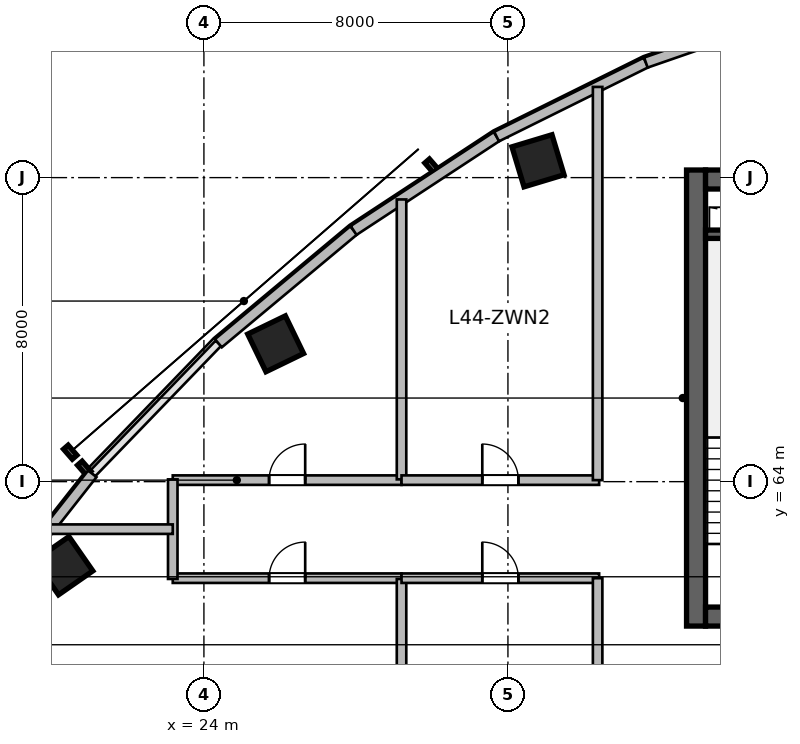
"""IFC4 building model, lengths in metres.
Left out: names, types, materials, properties, quantities, classifications, styles, units other than length and angle.
Written with IfcOpenShell. Run it as: python <this file> out.ifc"""

import sys

from ifc_helpers import new_model, si_unit, direction, frame, frame_2d, origin, origin_2d, place, context, subcontext, project, spatial, rectangle, extrude, source, transform, mapped, element, fill, save


model = new_model("IFC4")
c1 = context("Model", 3, precision=1e-05, world=origin(), true_north=direction((0.0, 1.0)))
c2 = subcontext(c1, "Body", "Model", "MODEL_VIEW")
j1 = project(units=[si_unit("LENGTHUNIT", "METRE"), si_unit("PLANEANGLEUNIT", "RADIAN")], contexts=[c1])
p1 = place(None, origin())
s1 = spatial("IfcSite", under=j1, at=p1, CompositionType="ELEMENT")
p2 = place(p1, origin())
s2 = spatial("IfcBuilding", under=s1, at=p2, CompositionType="ELEMENT")
p3 = place(p2, frame((0.0, 0.0, 181.8)))
s3 = spatial("IfcBuildingStorey", under=s2, at=p3, CompositionType="ELEMENT", Elevation=181.8)
m1 = source(origin(), c2, "Body", "SweptSolid", [
    extrude(rectangle(XDim=12.0, YDim=0.5, at=frame_2d((6.0, 0.0))), origin(), (0.0, 0.0, 1.0), 3.9),
])
p4 = place(p3, frame((36.95, 60.2, 0.0), z_axis=(0.0, 0.0, 1.0), x_axis=(0.0, 1.0, 0.0)))
e1 = element("IfcWall", 1, at=p4, inside=s3, PredefinedType="SHEAR", context=c2, shape_type="MappedRepresentation", body=[
    mapped(m1, transform((0.0, 0.0, 0.0), scale=1.0)),
])
m2 = source(origin(), c2, "Body", "SweptSolid", [
    extrude(rectangle(XDim=21.6, YDim=0.5, at=frame_2d((10.8, 0.0))), origin(), (0.0, 0.0, 1.0), 3.9),
])
p5 = place(p3, frame((37.2, 60.45, 0.0), z_axis=(0.0, 0.0, 1.0), x_axis=(1.0, 0.0, 0.0)))
e2 = element("IfcWall", 2, at=p5, inside=s3, PredefinedType="SHEAR", context=c2, shape_type="MappedRepresentation", body=[
    mapped(m2, transform((0.0, 0.0, 0.0), scale=1.0)),
])
p6 = place(p5, frame((1.1, 0.0, 0.0)))
e3 = element("IfcOpeningElement", 3, at=p6, cuts=e2, PredefinedType="OPENING", context=c2, shape_type="SweptSolid", body=[
    extrude(rectangle(XDim=1.15, YDim=2.15, at=frame_2d((0.575, 1.075))), frame((0.0, 0.26, 0.0), z_axis=(0.0, -1.0, 0.0), x_axis=(1.0, 0.0, 0.0)), (0.0, 0.0, 1.0), 0.52),
])
p7 = place(p5, frame((19.5, 0.0, 0.0)))
e4 = element("IfcOpeningElement", 4, at=p7, cuts=e2, PredefinedType="OPENING", context=c2, shape_type="SweptSolid", body=[
    extrude(rectangle(XDim=0.9, YDim=2.1, at=frame_2d((0.45, 1.05))), frame((0.0, 0.26, 0.0), z_axis=(0.0, -1.0, 0.0), x_axis=(1.0, 0.0, 0.0)), (0.0, 0.0, 1.0), 0.52),
])
p8 = place(p5, frame((12.02, 0.0, 0.0)))
e5 = element("IfcOpeningElement", 5, at=p8, cuts=e2, PredefinedType="OPENING", context=c2, shape_type="SweptSolid", body=[
    extrude(rectangle(XDim=1.6, YDim=2.15, at=frame_2d((0.8, 1.075))), frame((0.0, 0.26, 0.0), z_axis=(0.0, -1.0, 0.0), x_axis=(1.0, 0.0, 0.0)), (0.0, 0.0, 1.0), 0.52),
])
p9 = place(p3, frame((37.2, 71.95, 0.0), z_axis=(0.0, 0.0, 1.0), x_axis=(1.0, 0.0, 0.0)))
e6 = element("IfcWall", 6, at=p9, inside=s3, PredefinedType="SHEAR", context=c2, shape_type="MappedRepresentation", body=[
    mapped(m2, transform((0.0, 0.0, 0.0), scale=1.0)),
])
p10 = place(p9, frame((1.2, 0.0, 0.0)))
e7 = element("IfcOpeningElement", 7, at=p10, cuts=e6, PredefinedType="OPENING", context=c2, shape_type="SweptSolid", body=[
    extrude(rectangle(XDim=0.9, YDim=2.1, at=frame_2d((0.45, 1.05))), frame((0.0, 0.26, 0.0), z_axis=(0.0, -1.0, 0.0), x_axis=(1.0, 0.0, 0.0)), (0.0, 0.0, 1.0), 0.52),
])
p11 = place(p9, frame((14.7, 0.0, 0.0)))
e8 = element("IfcOpeningElement", 8, at=p11, cuts=e6, PredefinedType="OPENING", context=c2, shape_type="SweptSolid", body=[
    extrude(rectangle(XDim=1.2, YDim=2.15, at=frame_2d((0.6, 1.075))), frame((0.0, 0.26, 0.0), z_axis=(0.0, -1.0, 0.0), x_axis=(1.0, 0.0, 0.0)), (0.0, 0.0, 1.0), 0.52),
])
p12 = place(p9, frame((4.15, 0.0, 0.0)))
e9 = element("IfcOpeningElement", 9, at=p12, cuts=e6, PredefinedType="OPENING", context=c2, shape_type="SweptSolid", body=[
    extrude(rectangle(XDim=1.3, YDim=2.15, at=frame_2d((0.65, 1.075))), frame((0.0, 0.26, 0.0), z_axis=(0.0, -1.0, 0.0), x_axis=(1.0, 0.0, 0.0)), (0.0, 0.0, 1.0), 0.52),
])
p13 = place(p9, frame((7.25, 0.0, 0.0)))
e10 = element("IfcOpeningElement", 10, at=p13, cuts=e6, PredefinedType="OPENING", context=c2, shape_type="SweptSolid", body=[
    extrude(rectangle(XDim=0.9, YDim=2.1, at=frame_2d((0.45, 1.05))), frame((0.0, 0.26, 0.0), z_axis=(0.0, -1.0, 0.0), x_axis=(1.0, 0.0, 0.0)), (0.0, 0.0, 1.0), 0.52),
])
m3 = source(origin(), c2, "Body", "SweptSolid", [
    extrude(rectangle(XDim=3.27, YDim=0.22, at=frame_2d((1.635, 0.0))), origin(), (0.0, 0.0, 1.0), 3.9),
])
p14 = place(p3, frame((37.2, 70.51, 0.0), z_axis=(0.0, 0.0, 1.0), x_axis=(1.0, 0.0, 0.0)))
e11 = element("IfcWall", 11, at=p14, inside=s3, PredefinedType="SHEAR", context=c2, shape_type="MappedRepresentation", body=[
    mapped(m3, transform((0.0, 0.0, 0.0), scale=1.0)),
])
m4 = source(origin(), c2, "Body", "SweptSolid", [
    extrude(rectangle(XDim=1.1, YDim=1.1, at=origin_2d()), origin(), (0.0, 0.0, 1.0), 3.9),
])
for number, where, z_axis, x_axis in (
    (12, (20.311, 61.789, 0.0), (0.0, 0.0, 1.0), (-0.571, 0.821, 0.0)),
    (13, (25.888, 67.627, 0.0), (0.0, 0.0, 1.0), (-0.436, 0.9, 0.0)),
    (14, (32.791, 72.442, 0.0), (0.0, 0.0, 1.0), (-0.289, 0.957, 0.0)),
):
    element("IfcColumn", number, at=place(p3, frame(where, z_axis=z_axis, x_axis=x_axis)), inside=s3, PredefinedType="COLUMN", context=c2, shape_type="MappedRepresentation", body=[
        mapped(m4, transform((0.0, 0.0, 0.0), scale=1.0)),
    ])
m5 = source(origin(), c2, "Body", "SweptSolid", [
    extrude(rectangle(XDim=4.922, YDim=0.28, at=frame_2d((2.461, 0.0))), origin(), (0.0, 0.0, 1.0), 3.65),
])
p15 = place(p3, frame((18.021, 60.338, 0.0), z_axis=(0.0, 0.0, 1.0), x_axis=(0.61817639101, 0.786039407153, 0.0)))
e15 = element("IfcWall", 15, at=p15, inside=s3, PredefinedType="SOLIDWALL", context=c2, shape_type="MappedRepresentation", body=[
    mapped(m5, transform((0.0, 0.0, 0.0), scale=1.0)),
])
m6 = source(origin(), c2, "Body", "SweptSolid", [
    extrude(rectangle(XDim=4.634, YDim=0.28, at=frame_2d((2.317, 0.0))), origin(), (0.0, 0.0, 1.0), 3.65),
])
p16 = place(p3, frame((24.381, 67.642, 0.0), z_axis=(0.0, 0.0, 1.0), x_axis=(0.767910229096, 0.640557475993, 0.0)))
e16 = element("IfcWall", 16, at=p16, inside=s3, PredefinedType="SOLIDWALL", context=c2, shape_type="MappedRepresentation", body=[
    mapped(m6, transform((0.0, 0.0, 0.0), scale=1.0)),
])
m7 = source(origin(), c2, "Body", "SweptSolid", [
    extrude(rectangle(XDim=4.501, YDim=0.28, at=frame_2d((2.25, 0.0))), origin(), (0.0, 0.0, 1.0), 3.65),
])
p17 = place(p3, frame((27.939, 70.61, 0.0), z_axis=(0.0, 0.0, 1.0), x_axis=(0.835984920737, 0.548752414391, 0.0)))
e17 = element("IfcWall", 17, at=p17, inside=s3, PredefinedType="SOLIDWALL", context=c2, shape_type="MappedRepresentation", body=[
    mapped(m7, transform((0.0, 0.0, 0.0), scale=1.0)),
])
m8 = source(origin(), c2, "Body", "SweptSolid", [
    extrude(rectangle(XDim=4.384, YDim=0.28, at=frame_2d((2.192, 0.0))), origin(), (0.0, 0.0, 1.0), 3.65),
])
p18 = place(p3, frame((31.702, 73.08, 0.0), z_axis=(0.0, 0.0, 1.0), x_axis=(0.895969968053, 0.444114643248, 0.0)))
e18 = element("IfcWall", 18, at=p18, inside=s3, PredefinedType="SOLIDWALL", context=c2, shape_type="MappedRepresentation", body=[
    mapped(m8, transform((0.0, 0.0, 0.0), scale=1.0)),
])
m9 = source(origin(), c2, "Body", "SweptSolid", [
    extrude(rectangle(XDim=4.29, YDim=0.28, at=frame_2d((2.145, 0.0))), origin(), (0.0, 0.0, 1.0), 3.65),
])
p19 = place(p3, frame((35.63, 75.027, 0.0), z_axis=(0.0, 0.0, 1.0), x_axis=(0.944883859218, 0.3274057003, 0.0)))
e19 = element("IfcWall", 19, at=p19, inside=s3, PredefinedType="SOLIDWALL", context=c2, shape_type="MappedRepresentation", body=[
    mapped(m9, transform((0.0, 0.0, 0.0), scale=1.0)),
])
m10 = source(origin(), c2, "Body", "SweptSolid", [
    extrude(rectangle(XDim=6.02, YDim=0.25, at=frame_2d((3.01, 0.0))), origin(), (0.0, 0.0, 1.0), 3.65),
])
p20 = place(p3, frame((23.18, 64.04, 0.0), z_axis=(0.0, 0.0, 1.0), x_axis=(1.0, 0.0, 0.0)))
e20 = element("IfcWall", 20, at=p20, inside=s3, PredefinedType="PARTITIONING", context=c2, shape_type="MappedRepresentation", body=[
    mapped(m10, transform((0.0, 0.0, 0.0), scale=1.0)),
])
p21 = place(p20, frame((2.535, 0.0, 0.0)))
e21 = element("IfcOpeningElement", 21, at=p21, cuts=e20, PredefinedType="OPENING", context=c2, shape_type="SweptSolid", body=[
    extrude(rectangle(XDim=0.95, YDim=2.1, at=frame_2d((0.475, 1.05))), frame((0.0, 0.135, 0.0), z_axis=(0.0, -1.0, 0.0), x_axis=(1.0, 0.0, 0.0)), (0.0, 0.0, 1.0), 0.27),
])
m11 = source(origin(), c2, "Body", "SweptSolid", [
    extrude(rectangle(XDim=7.365, YDim=0.25, at=frame_2d((3.683, 0.0))), origin(), (0.0, 0.0, 1.0), 3.65),
])
p22 = place(p3, frame((29.2, 64.06, 0.0), z_axis=(0.0, 0.0, 1.0), x_axis=(0.0, 1.0, 0.0)))
e22 = element("IfcWall", 22, at=p22, inside=s3, PredefinedType="PARTITIONING", context=c2, shape_type="MappedRepresentation", body=[
    mapped(m11, transform((0.0, 0.0, 0.0), scale=1.0)),
])
m12 = source(origin(), c2, "Body", "SweptSolid", [
    extrude(rectangle(XDim=5.2, YDim=0.25, at=frame_2d((2.6, 0.0))), origin(), (0.0, 0.0, 1.0), 3.65),
])
p23 = place(p3, frame((29.2, 64.04, 0.0), z_axis=(0.0, 0.0, 1.0), x_axis=(1.0, 0.0, 0.0)))
e23 = element("IfcWall", 23, at=p23, inside=s3, PredefinedType="PARTITIONING", context=c2, shape_type="MappedRepresentation", body=[
    mapped(m12, transform((0.0, 0.0, 0.0), scale=1.0)),
])
p24 = place(p23, frame((2.125, 0.0, 0.0)))
e24 = element("IfcOpeningElement", 24, at=p24, cuts=e23, PredefinedType="OPENING", context=c2, shape_type="SweptSolid", body=[
    extrude(rectangle(XDim=0.95, YDim=2.1, at=frame_2d((0.475, 1.05))), frame((0.0, 0.135, 0.0), z_axis=(0.0, -1.0, 0.0), x_axis=(1.0, 0.0, 0.0)), (0.0, 0.0, 1.0), 0.27),
])
p25 = place(p3, frame((23.18, 61.46, 0.0), z_axis=(0.0, 0.0, 1.0), x_axis=(1.0, 0.0, 0.0)))
e25 = element("IfcWall", 25, at=p25, inside=s3, PredefinedType="PARTITIONING", context=c2, shape_type="MappedRepresentation", body=[
    mapped(m10, transform((0.0, 0.0, 0.0), scale=1.0)),
])
p26 = place(p25, frame((2.535, 0.0, 0.0)))
e26 = element("IfcOpeningElement", 26, at=p26, cuts=e25, PredefinedType="OPENING", context=c2, shape_type="SweptSolid", body=[
    extrude(rectangle(XDim=0.95, YDim=2.1, at=frame_2d((0.475, 1.05))), frame((0.0, 0.135, 0.0), z_axis=(0.0, -1.0, 0.0), x_axis=(1.0, 0.0, 0.0)), (0.0, 0.0, 1.0), 0.27),
])
m13 = source(origin(), c2, "Body", "SweptSolid", [
    extrude(rectangle(XDim=18.301, YDim=0.25, at=frame_2d((9.15, 0.0))), origin(), (0.0, 0.0, 1.0), 2.942),
])
p27 = place(p3, frame((29.2, 43.139, 0.0), z_axis=(0.0, 0.0, 1.0), x_axis=(0.0, 1.0, 0.0)))
e27 = element("IfcWall", 27, at=p27, inside=s3, PredefinedType="PARTITIONING", context=c2, shape_type="MappedRepresentation", body=[
    mapped(m13, transform((0.0, 0.0, 0.0), scale=1.0)),
])
p28 = place(p3, frame((29.2, 61.46, 0.0), z_axis=(0.0, 0.0, 1.0), x_axis=(1.0, 0.0, 0.0)))
e28 = element("IfcWall", 28, at=p28, inside=s3, PredefinedType="PARTITIONING", context=c2, shape_type="MappedRepresentation", body=[
    mapped(m12, transform((0.0, 0.0, 0.0), scale=1.0)),
])
p29 = place(p28, frame((2.125, 0.0, 0.0)))
e29 = element("IfcOpeningElement", 29, at=p29, cuts=e28, PredefinedType="OPENING", context=c2, shape_type="SweptSolid", body=[
    extrude(rectangle(XDim=0.95, YDim=2.1, at=frame_2d((0.475, 1.05))), frame((0.0, 0.135, 0.0), z_axis=(0.0, -1.0, 0.0), x_axis=(1.0, 0.0, 0.0)), (0.0, 0.0, 1.0), 0.27),
])
m14 = source(origin(), c2, "Body", "SweptSolid", [
    extrude(rectangle(XDim=12.126, YDim=0.25, at=frame_2d((6.063, 0.0))), origin(), (0.0, 0.0, 1.0), 3.65),
])
p30 = place(p3, frame((34.36, 49.334, 0.0), z_axis=(0.0, 0.0, 1.0), x_axis=(0.0, 1.0, 0.0)))
e30 = element("IfcWall", 30, at=p30, inside=s3, PredefinedType="PARTITIONING", context=c2, shape_type="MappedRepresentation", body=[
    mapped(m14, transform((0.0, 0.0, 0.0), scale=1.0)),
])
m15 = source(origin(), c2, "Body", "SweptSolid", [
    extrude(rectangle(XDim=10.346, YDim=0.25, at=frame_2d((5.173, 0.0))), origin(), (0.0, 0.0, 1.0), 3.65),
])
p31 = place(p3, frame((34.36, 64.04, 0.0), z_axis=(0.0, 0.0, 1.0), x_axis=(0.0, 1.0, 0.0)))
e31 = element("IfcWall", 31, at=p31, inside=s3, PredefinedType="PARTITIONING", context=c2, shape_type="MappedRepresentation", body=[
    mapped(m15, transform((0.0, 0.0, 0.0), scale=1.0)),
])
m16 = source(origin(), c2, "Body", "SweptSolid", [
    extrude(rectangle(XDim=2.62, YDim=0.25, at=frame_2d((1.31, 0.0))), origin(), (0.0, 0.0, 1.0), 3.65),
])
p32 = place(p3, frame((23.18, 61.44, 0.0), z_axis=(0.0, 0.0, 1.0), x_axis=(0.0, 1.0, 0.0)))
e32 = element("IfcWall", 32, at=p32, inside=s3, PredefinedType="PARTITIONING", context=c2, shape_type="MappedRepresentation", body=[
    mapped(m16, transform((0.0, 0.0, 0.0), scale=1.0)),
])
m17 = source(origin(), c2, "Body", "SweptSolid", [
    extrude(rectangle(XDim=3.249, YDim=0.25, at=frame_2d((1.625, 0.0))), origin(), (0.0, 0.0, 1.0), 3.65),
])
p33 = place(p3, frame((19.931, 62.75, 0.0), z_axis=(0.0, 0.0, 1.0), x_axis=(1.0, 0.0, 0.0)))
e33 = element("IfcWall", 33, at=p33, inside=s3, PredefinedType="PARTITIONING", context=c2, shape_type="MappedRepresentation", body=[
    mapped(m17, transform((0.0, 0.0, 0.0), scale=1.0)),
])
m18 = source(origin(), c2, "Body", "SweptSolid", [
    extrude(rectangle(XDim=0.95, YDim=2.1, at=frame_2d((0.475, 1.05))), frame((0.0, 0.025, 0.0), z_axis=(0.0, -1.0, 0.0), x_axis=(1.0, 0.0, 0.0)), (0.0, 0.0, 1.0), 0.05),
])
p34 = place(p21, origin())
e34 = element("IfcDoor", 34, at=p34, inside=s3, OperationType="SINGLE_SWING_RIGHT", PredefinedType="DOOR", context=c2, shape_type="MappedRepresentation", body=[
    mapped(m18, transform((0.0, 0.0, 0.0), scale=1.0)),
])
fill(e21, e34)
p35 = place(p24, origin())
e35 = element("IfcDoor", 35, at=p35, inside=s3, OperationType="SINGLE_SWING_LEFT", PredefinedType="DOOR", context=c2, shape_type="MappedRepresentation", body=[
    mapped(m18, transform((0.0, 0.0, 0.0), scale=1.0)),
])
fill(e24, e35)
p36 = place(p26, origin())
e36 = element("IfcDoor", 36, at=p36, inside=s3, OperationType="SINGLE_SWING_RIGHT", PredefinedType="DOOR", context=c2, shape_type="MappedRepresentation", body=[
    mapped(m18, transform((0.0, 0.0, 0.0), scale=1.0)),
])
fill(e26, e36)
p37 = place(p29, origin())
e37 = element("IfcDoor", 37, at=p37, inside=s3, OperationType="SINGLE_SWING_LEFT", PredefinedType="DOOR", context=c2, shape_type="MappedRepresentation", body=[
    mapped(m18, transform((0.0, 0.0, 0.0), scale=1.0)),
])
fill(e29, e37)
save(model, sys.argv[1])
